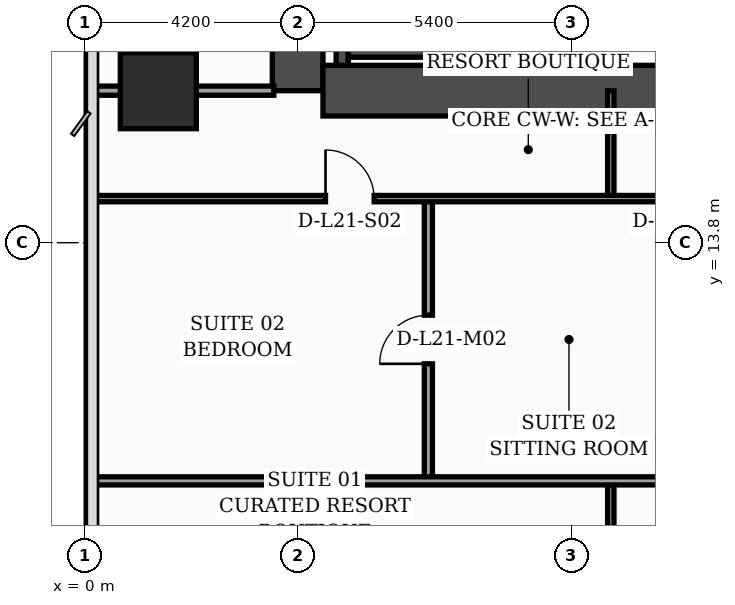
"""IFC4 building model, lengths in metres.
Left out: names, types, materials, properties, quantities, classifications, styles, units other than length and angle.
Written with IfcOpenShell. Run it as: python <this file> out.ifc"""

import sys

from ifc_helpers import new_model, si_unit, direction, frame, frame_2d, origin, origin_2d, place, context, subcontext, project, spatial, rectangle, extrude, element, fill, save


model = new_model("IFC4")
c1 = context("Model", 3, precision=1e-05, world=origin(), true_north=direction((0.0, 1.0)))
c2 = subcontext(c1, "Body", "Model", "MODEL_VIEW")
j1 = project(units=[si_unit("LENGTHUNIT", "METRE"), si_unit("PLANEANGLEUNIT", "RADIAN")], contexts=[c1])
p1 = place(None, origin())
s1 = spatial("IfcSite", under=j1, at=p1, CompositionType="ELEMENT")
p2 = place(p1, origin())
s2 = spatial("IfcBuilding", under=s1, at=p2, CompositionType="ELEMENT")
p3 = place(p2, frame((0.0, 0.0, 88.8)))
s3 = spatial("IfcBuildingStorey", under=s2, at=p3, CompositionType="ELEMENT", Elevation=88.8)
p4 = place(p3, frame((4.2, 16.8, 0.0), z_axis=(0.0, 0.0, 1.0), x_axis=(0.0, 1.0, 0.0)))
e1 = element("IfcWall", 1, at=p4, inside=s3, PredefinedType="SHEAR", context=c2, shape_type="SweptSolid", body=[
    extrude(rectangle(XDim=21.6, YDim=1.0, at=frame_2d((10.8, 0.0))), origin(), (0.0, 0.0, 1.0), 3.52),
])
p5 = place(p3, frame((4.7, 16.8, 0.0), z_axis=(0.0, 0.0, 1.0), x_axis=(1.0, 0.0, 0.0)))
e2 = element("IfcWall", 2, at=p5, inside=s3, PredefinedType="SHEAR", context=c2, shape_type="SweptSolid", body=[
    extrude(rectangle(XDim=9.8, YDim=1.0, at=frame_2d((4.9, 0.0))), origin(), (0.0, 0.0, 1.0), 3.52),
])
p6 = place(p3, frame((5.08, 17.3, 0.0), z_axis=(0.0, 0.0, 1.0), x_axis=(0.0, 1.0, 0.0)))
e3 = element("IfcWall", 3, at=p6, inside=s3, PredefinedType="SOLIDWALL", context=c2, shape_type="SweptSolid", body=[
    extrude(rectangle(XDim=9.49, YDim=0.24, at=frame_2d((4.745, 0.0))), origin(), (0.0, 0.0, 1.0), 3.52),
])
p7 = place(p3, frame((8.42, 17.3, 0.0), z_axis=(0.0, 0.0, 1.0), x_axis=(0.0, 1.0, 0.0)))
e4 = element("IfcWall", 4, at=p7, inside=s3, PredefinedType="SOLIDWALL", context=c2, shape_type="SweptSolid", body=[
    extrude(rectangle(XDim=9.49, YDim=0.24, at=frame_2d((4.745, 0.0))), origin(), (0.0, 0.0, 1.0), 3.52),
])
p8 = place(p7, frame((0.35, 0.0, 0.0)))
e5 = element("IfcOpeningElement", 5, at=p8, cuts=e4, PredefinedType="OPENING", context=c2, shape_type="SweptSolid", body=[
    extrude(rectangle(XDim=1.15, YDim=2.2, at=frame_2d((0.575, 1.1))), frame((0.0, 0.13, 0.0), z_axis=(0.0, -1.0, 0.0), x_axis=(1.0, 0.0, 0.0)), (0.0, 0.0, 1.0), 0.26),
])
p9 = place(p3, frame((5.2, 17.58, 0.0), z_axis=(0.0, 0.0, 1.0), x_axis=(1.0, 0.0, 0.0)))
e6 = element("IfcWall", 6, at=p9, inside=s3, PredefinedType="SOLIDWALL", context=c2, shape_type="SweptSolid", body=[
    extrude(rectangle(XDim=3.1, YDim=0.24, at=frame_2d((1.55, 0.0))), origin(), (0.0, 0.0, 1.0), 3.52),
])
p10 = place(p3, frame((1.45, 16.8, 0.0), z_axis=(0.0, 0.0, 1.0), x_axis=(1.0, 0.0, 0.0)))
e7 = element("IfcColumn", 7, at=p10, inside=s3, PredefinedType="COLUMN", context=c2, shape_type="SweptSolid", body=[
    extrude(rectangle(XDim=1.5, YDim=1.5, at=origin_2d()), origin(), (0.0, 0.0, 1.0), 3.52),
])
p11 = place(p3, frame((9.68, 17.32, 0.0), z_axis=(0.0, 0.0, 1.0), x_axis=(0.0, 1.0, 0.0)))
e8 = element("IfcWall", 8, at=p11, inside=s3, PredefinedType="SOLIDWALL", context=c2, shape_type="SweptSolid", body=[
    extrude(rectangle(XDim=7.68, YDim=0.22, at=frame_2d((3.84, 0.0))), origin(), (0.0, 0.0, 1.0), 3.52),
])
p12 = place(p3, frame((0.08, 16.8, 0.0), z_axis=(0.0, 0.0, 1.0), x_axis=(1.0, 0.0, 0.0)))
e9 = element("IfcWall", 9, at=p12, inside=s3, PredefinedType="PARTITIONING", context=c2, shape_type="SweptSolid", body=[
    extrude(rectangle(XDim=3.65, YDim=0.18, at=frame_2d((1.825, 0.0))), origin(), (0.0, 0.0, 1.0), 2.82),
])
p13 = place(p3, frame((10.38, 7.17, 0.0), z_axis=(0.0, 0.0, 1.0), x_axis=(0.0, 1.0, 0.0)))
e10 = element("IfcWall", 10, at=p13, inside=s3, PredefinedType="PARTITIONING", context=c2, shape_type="SweptSolid", body=[
    extrude(rectangle(XDim=1.93, YDim=0.125, at=frame_2d((0.965, 0.0))), origin(), (0.0, 0.0, 1.0), 3.52),
])
p14 = place(p3, frame((10.38, 14.67, 0.0), z_axis=(0.0, 0.0, 1.0), x_axis=(0.0, 1.0, 0.0)))
e11 = element("IfcWall", 11, at=p14, inside=s3, PredefinedType="PARTITIONING", context=c2, shape_type="SweptSolid", body=[
    extrude(rectangle(XDim=2.13, YDim=0.125, at=frame_2d((1.065, 0.0))), origin(), (0.0, 0.0, 1.0), 3.52),
])
p15 = place(p3, frame((6.78, 9.1, 0.0), z_axis=(0.0, 0.0, 1.0), x_axis=(0.0, 1.0, 0.0)))
e12 = element("IfcWall", 12, at=p15, inside=s3, PredefinedType="PARTITIONING", context=c2, shape_type="SweptSolid", body=[
    extrude(rectangle(XDim=5.57, YDim=0.16, at=frame_2d((2.785, 0.0))), origin(), (0.0, 0.0, 1.0), 3.12),
])
p16 = place(p15, frame((2.31, 0.0, 0.0)))
e13 = element("IfcOpeningElement", 13, at=p16, cuts=e12, PredefinedType="OPENING", context=c2, shape_type="SweptSolid", body=[
    extrude(rectangle(XDim=0.96, YDim=2.2, at=frame_2d((0.48, 1.1))), frame((0.0, 0.09, 0.0), z_axis=(0.0, -1.0, 0.0), x_axis=(1.0, 0.0, 0.0)), (0.0, 0.0, 1.0), 0.18),
])
p17 = place(p3, frame((0.08, 14.67, 0.0), z_axis=(0.0, 0.0, 1.0), x_axis=(1.0, 0.0, 0.0)))
e14 = element("IfcWall", 14, at=p17, inside=s3, PredefinedType="PARTITIONING", context=c2, shape_type="SweptSolid", body=[
    extrude(rectangle(XDim=13.22, YDim=0.125, at=frame_2d((6.61, 0.0))), origin(), (0.0, 0.0, 1.0), 2.82),
])
p18 = place(p17, frame((4.67, 0.0, 0.0)))
e15 = element("IfcOpeningElement", 15, at=p18, cuts=e14, PredefinedType="OPENING", context=c2, shape_type="SweptSolid", body=[
    extrude(rectangle(XDim=0.96, YDim=2.2, at=frame_2d((0.48, 1.1))), frame((0.0, 0.073, 0.0), z_axis=(0.0, -1.0, 0.0), x_axis=(1.0, 0.0, 0.0)), (0.0, 0.0, 1.0), 0.145),
])
p19 = place(p17, frame((11.31, 0.0, 0.0)))
e16 = element("IfcOpeningElement", 16, at=p19, cuts=e14, PredefinedType="OPENING", context=c2, shape_type="SweptSolid", body=[
    extrude(rectangle(XDim=0.9, YDim=2.15, at=frame_2d((0.45, 1.075))), frame((0.0, 0.073, 0.0), z_axis=(0.0, -1.0, 0.0), x_axis=(1.0, 0.0, 0.0)), (0.0, 0.0, 1.0), 0.145),
])
p20 = place(p3, frame((0.08, 9.1, 0.0), z_axis=(0.0, 0.0, 1.0), x_axis=(1.0, 0.0, 0.0)))
e17 = element("IfcWall", 17, at=p20, inside=s3, PredefinedType="PARTITIONING", context=c2, shape_type="SweptSolid", body=[
    extrude(rectangle(XDim=13.22, YDim=0.16, at=frame_2d((6.61, 0.0))), origin(), (0.0, 0.0, 1.0), 2.82),
])
p21 = place(p16, origin())
e18 = element("IfcDoor", 18, at=p21, inside=s3, OperationType="SINGLE_SWING_LEFT", PredefinedType="DOOR", context=c2, shape_type="SweptSolid", body=[
    extrude(rectangle(XDim=0.96, YDim=2.2, at=frame_2d((0.48, 1.1))), frame((0.0, 0.025, 0.0), z_axis=(0.0, -1.0, 0.0), x_axis=(1.0, 0.0, 0.0)), (0.0, 0.0, 1.0), 0.05),
])
fill(e13, e18)
p22 = place(p18, origin())
e19 = element("IfcDoor", 19, at=p22, inside=s3, OperationType="SINGLE_SWING_LEFT", PredefinedType="DOOR", context=c2, shape_type="SweptSolid", body=[
    extrude(rectangle(XDim=0.96, YDim=2.2, at=frame_2d((0.48, 1.1))), frame((0.0, 0.025, 0.0), z_axis=(0.0, -1.0, 0.0), x_axis=(1.0, 0.0, 0.0)), (0.0, 0.0, 1.0), 0.05),
])
fill(e15, e19)
save(model, sys.argv[1])
